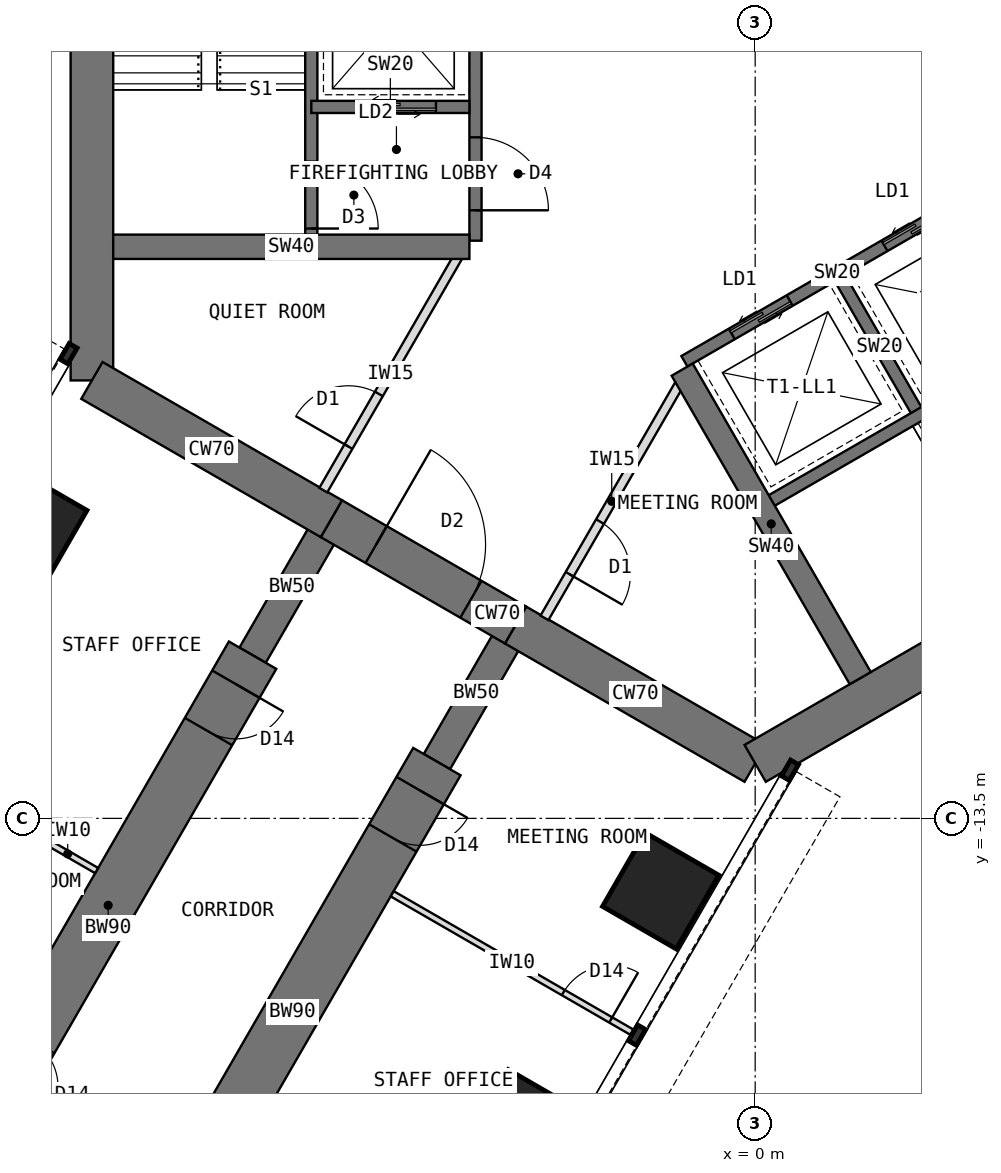
"""IFC4 building model, lengths in metres.
Left out: names, types, materials, properties, quantities, classifications, styles, units other than length and angle.
Written with IfcOpenShell. Run it as: python <this file> out.ifc"""

import sys

from ifc_helpers import new_model, si_unit, direction, frame, frame_2d, origin, origin_2d, place, context, subcontext, project, spatial, rectangle, extrude, element, fill, save


model = new_model("IFC4")
c1 = context("Model", 3, precision=1e-05, world=origin(), true_north=direction((0.0, 1.0)))
c2 = subcontext(c1, "Body", "Model", "MODEL_VIEW")
j1 = project(units=[si_unit("LENGTHUNIT", "METRE"), si_unit("PLANEANGLEUNIT", "RADIAN")], contexts=[c1])
p1 = place(None, origin())
s1 = spatial("IfcSite", under=j1, at=p1, CompositionType="ELEMENT")
p2 = place(p1, origin())
s2 = spatial("IfcBuilding", under=s1, at=p2, CompositionType="ELEMENT")
p3 = place(p2, frame((0.0, 0.0, 84.5)))
s3 = spatial("IfcBuildingStorey", under=s2, at=p3, CompositionType="ELEMENT", Elevation=84.5)
p4 = place(p3, frame((-10.908, 6.298, 0.0), z_axis=(0.0, 0.0, 1.0), x_axis=(0.0, -1.0, 0.0)))
e1 = element("IfcWall", 1, at=p4, inside=s3, PredefinedType="SHEAR", context=c2, shape_type="SweptSolid", body=[
    extrude(rectangle(XDim=12.596, YDim=0.7, at=frame_2d((6.298, 0.0))), origin(), (0.0, 0.0, 1.0), 4.0),
])
p5 = place(p3, frame((-10.908, -6.298, 0.0), z_axis=(0.0, 0.0, 1.0), x_axis=(0.866034513004, -0.499984222037, 0.0)))
e2 = element("IfcWall", 2, at=p5, inside=s3, PredefinedType="SHEAR", context=c2, shape_type="SweptSolid", body=[
    extrude(rectangle(XDim=4.548, YDim=0.7, at=frame_2d((2.274, 0.0))), origin(), (0.0, 0.0, 1.0), 4.0),
])
p6 = place(p3, frame((-6.97, -8.572, 0.0), z_axis=(0.0, 0.0, 1.0), x_axis=(0.866019471182, -0.500010275428, 0.0)))
e3 = element("IfcWall", 3, at=p6, inside=s3, PredefinedType="SHEAR", context=c2, shape_type="SweptSolid", body=[
    extrude(rectangle(XDim=3.5, YDim=0.7, at=frame_2d((1.75, 0.0))), origin(), (0.0, 0.0, 1.0), 4.0),
])
p7 = place(p6, frame((0.85, 0.0, 0.0)))
e4 = element("IfcOpeningElement", 4, at=p7, cuts=e3, PredefinedType="OPENING", context=c2, shape_type="SweptSolid", body=[
    extrude(rectangle(XDim=1.8, YDim=2.1, at=frame_2d((0.9, 1.05))), frame((0.0, 0.36, 0.0), z_axis=(0.0, -1.0, 0.0), x_axis=(1.0, 0.0, 0.0)), (0.0, 0.0, 1.0), 0.72),
])
p8 = place(p3, frame((-3.939, -10.322, 0.0), z_axis=(0.0, 0.0, 1.0), x_axis=(0.866011268655, -0.500024481964, 0.0)))
e5 = element("IfcWall", 5, at=p8, inside=s3, PredefinedType="SHEAR", context=c2, shape_type="SweptSolid", body=[
    extrude(rectangle(XDim=4.548, YDim=0.7, at=frame_2d((2.274, 0.0))), origin(), (0.0, 0.0, 1.0), 4.0),
])
p9 = place(p3, frame((0.0, -12.596, 0.0), z_axis=(0.0, 0.0, 1.0), x_axis=(0.866021940709, 0.500005998175, 0.0)))
e6 = element("IfcWall", 6, at=p9, inside=s3, PredefinedType="SHEAR", context=c2, shape_type="SweptSolid", body=[
    extrude(rectangle(XDim=12.596, YDim=0.7, at=frame_2d((6.298, 0.0))), origin(), (0.0, 0.0, 1.0), 4.0),
])
p10 = place(p3, frame((-3.939, -10.322, 0.0), z_axis=(0.0, 0.0, 1.0), x_axis=(-0.499918158782, -0.866072649678, 0.0)))
e7 = element("IfcWall", 7, at=p10, inside=s3, PredefinedType="SHEAR", context=c2, shape_type="SweptSolid", body=[
    extrude(rectangle(XDim=2.592, YDim=0.5, at=frame_2d((1.296, 0.0))), origin(), (0.0, 0.0, 1.0), 4.0),
])
p11 = place(p3, frame((-5.234, -12.566, 0.0), z_axis=(0.0, 0.0, 1.0), x_axis=(-0.499997557548, -0.86602681393, 0.0)))
e8 = element("IfcWall", 8, at=p11, inside=s3, PredefinedType="SHEAR", context=c2, shape_type="SweptSolid", body=[
    extrude(rectangle(XDim=9.5, YDim=0.9, at=frame_2d((4.75, 0.0))), origin(), (0.0, 0.0, 1.0), 4.0),
])
p12 = place(p11, frame((0.55, 0.0, 0.0)))
e9 = element("IfcOpeningElement", 9, at=p12, cuts=e8, PredefinedType="OPENING", context=c2, shape_type="SweptSolid", body=[
    extrude(rectangle(XDim=0.9, YDim=2.1, at=frame_2d((0.45, 1.05))), frame((0.0, 0.46, 0.0), z_axis=(0.0, -1.0, 0.0), x_axis=(1.0, 0.0, 0.0)), (0.0, 0.0, 1.0), 0.92),
])
p13 = place(p11, frame((7.3, 0.0, 0.0)))
e10 = element("IfcOpeningElement", 10, at=p13, cuts=e8, PredefinedType="OPENING", context=c2, shape_type="SweptSolid", body=[
    extrude(rectangle(XDim=0.9, YDim=2.1, at=frame_2d((0.45, 1.05))), frame((0.0, 0.46, 0.0), z_axis=(0.0, -1.0, 0.0), x_axis=(1.0, 0.0, 0.0)), (0.0, 0.0, 1.0), 0.92),
])
p14 = place(p3, frame((-6.97, -8.572, 0.0), z_axis=(0.0, 0.0, 1.0), x_axis=(-0.499988811324, -0.866031863473, 0.0)))
e11 = element("IfcWall", 11, at=p14, inside=s3, PredefinedType="SHEAR", context=c2, shape_type="SweptSolid", body=[
    extrude(rectangle(XDim=2.592, YDim=0.5, at=frame_2d((1.296, 0.0))), origin(), (0.0, 0.0, 1.0), 4.0),
])
p15 = place(p3, frame((-8.266, -10.816, 0.0), z_axis=(0.0, 0.0, 1.0), x_axis=(-0.499997557548, -0.86602681393, 0.0)))
e12 = element("IfcWall", 12, at=p15, inside=s3, PredefinedType="SHEAR", context=c2, shape_type="SweptSolid", body=[
    extrude(rectangle(XDim=9.5, YDim=0.9, at=frame_2d((4.75, 0.0))), origin(), (0.0, 0.0, 1.0), 4.0),
])
p16 = place(p15, frame((0.55, 0.0, 0.0)))
e13 = element("IfcOpeningElement", 13, at=p16, cuts=e12, PredefinedType="OPENING", context=c2, shape_type="SweptSolid", body=[
    extrude(rectangle(XDim=0.9, YDim=2.1, at=frame_2d((0.45, 1.05))), frame((0.0, 0.46, 0.0), z_axis=(0.0, -1.0, 0.0), x_axis=(1.0, 0.0, 0.0)), (0.0, 0.0, 1.0), 0.92),
])
p17 = place(p15, frame((7.3, 0.0, 0.0)))
e14 = element("IfcOpeningElement", 14, at=p17, cuts=e12, PredefinedType="OPENING", context=c2, shape_type="SweptSolid", body=[
    extrude(rectangle(XDim=0.9, YDim=2.1, at=frame_2d((0.45, 1.05))), frame((0.0, 0.46, 0.0), z_axis=(0.0, -1.0, 0.0), x_axis=(1.0, 0.0, 0.0)), (0.0, 0.0, 1.0), 0.92),
])
for number, where, z_axis, x_axis in (
    (15, (-1.554, -14.691, 0.0), (0.0, 0.0, 1.0), (0.5, 0.866, 0.0)),
    (16, (-11.946, -8.691, 0.0), (0.0, 0.0, 1.0), (0.5, 0.866, 0.0)),
    (17, (-3.804, -18.588, 0.0), (0.0, 0.0, 1.0), (0.5, 0.866, 0.0)),
):
    element("IfcColumn", number, at=place(p3, frame(where, z_axis=z_axis, x_axis=x_axis)), inside=s3, PredefinedType="COLUMN", context=c2, shape_type="SweptSolid", body=[
        extrude(rectangle(XDim=1.4, YDim=1.4, at=origin_2d()), origin(), (0.0, 0.0, 1.0), 4.0),
    ])
p18 = place(p3, frame((-4.6, 4.0, 0.0), z_axis=(0.0, 0.0, 1.0), x_axis=(0.0, -1.0, 0.0)))
e18 = element("IfcWall", 18, at=p18, inside=s3, PredefinedType="SHEAR", context=c2, shape_type="SweptSolid", body=[
    extrude(rectangle(XDim=8.0, YDim=0.2, at=frame_2d((4.0, 0.0))), origin(), (0.0, 0.0, 1.0), 4.0),
])
p19 = place(p18, frame((6.3, 0.0, 0.0)))
e19 = element("IfcOpeningElement", 19, at=p19, cuts=e18, PredefinedType="OPENING", context=c2, shape_type="SweptSolid", body=[
    extrude(rectangle(XDim=1.2, YDim=2.1, at=frame_2d((0.6, 1.05))), frame((0.0, 0.11, 0.0), z_axis=(0.0, -1.0, 0.0), x_axis=(1.0, 0.0, 0.0)), (0.0, 0.0, 1.0), 0.22),
])
p20 = place(p18, frame((0.9, 0.0, 0.0)))
e20 = element("IfcOpeningElement", 20, at=p20, cuts=e18, PredefinedType="OPENING", context=c2, shape_type="SweptSolid", body=[
    extrude(rectangle(XDim=1.1, YDim=2.2, at=frame_2d((0.55, 1.1))), frame((0.0, 0.11, 0.0), z_axis=(0.0, -1.0, 0.0), x_axis=(1.0, 0.0, 0.0)), (0.0, 0.0, 1.0), 0.22),
])
p21 = place(p3, frame((-4.7, -1.8, 0.0), z_axis=(0.0, 0.0, 1.0), x_axis=(-1.0, 0.0, 0.0)))
e21 = element("IfcWall", 21, at=p21, inside=s3, PredefinedType="SHEAR", context=c2, shape_type="SweptSolid", body=[
    extrude(rectangle(XDim=2.6, YDim=0.2, at=frame_2d((1.3, 0.0))), origin(), (0.0, 0.0, 1.0), 4.0),
])
p22 = place(p21, frame((0.55, 0.0, 0.0)))
e22 = element("IfcOpeningElement", 22, at=p22, cuts=e21, PredefinedType="OPENING", context=c2, shape_type="SweptSolid", body=[
    extrude(rectangle(XDim=1.3, YDim=2.2, at=frame_2d((0.65, 1.1))), frame((0.0, 0.11, 0.0), z_axis=(0.0, -1.0, 0.0), x_axis=(1.0, 0.0, 0.0)), (0.0, 0.0, 1.0), 0.22),
])
p23 = place(p3, frame((-7.3, 4.0, 0.0), z_axis=(0.0, 0.0, 1.0), x_axis=(0.0, -1.0, 0.0)))
e23 = element("IfcWall", 23, at=p23, inside=s3, PredefinedType="SHEAR", context=c2, shape_type="SweptSolid", body=[
    extrude(rectangle(XDim=8.0, YDim=0.2, at=frame_2d((4.0, 0.0))), origin(), (0.0, 0.0, 1.0), 4.0),
])
p24 = place(p23, frame((6.7, 0.0, 0.0)))
e24 = element("IfcOpeningElement", 24, at=p24, cuts=e23, PredefinedType="OPENING", context=c2, shape_type="SweptSolid", body=[
    extrude(rectangle(XDim=1.1, YDim=2.1, at=frame_2d((0.55, 1.05))), frame((0.0, 0.11, 0.0), z_axis=(0.0, -1.0, 0.0), x_axis=(1.0, 0.0, 0.0)), (0.0, 0.0, 1.0), 0.22),
])
p25 = place(p3, frame((-4.7, -4.1, 0.0), z_axis=(0.0, 0.0, 1.0), x_axis=(-1.0, 0.0, 0.0)))
e25 = element("IfcWall", 25, at=p25, inside=s3, PredefinedType="SHEAR", context=c2, shape_type="SweptSolid", body=[
    extrude(rectangle(XDim=5.858, YDim=0.4, at=frame_2d((2.929, 0.0))), origin(), (0.0, 0.0, 1.0), 4.0),
])
p26 = place(p3, frame((-1.164, -5.984, 0.0), z_axis=(0.0, 0.0, 1.0), x_axis=(0.866026010844, 0.49999894854, 0.0)))
e26 = element("IfcWall", 26, at=p26, inside=s3, PredefinedType="SHEAR", context=c2, shape_type="SweptSolid", body=[
    extrude(rectangle(XDim=8.0, YDim=0.2, at=frame_2d((4.0, 0.0))), origin(), (0.0, 0.0, 1.0), 4.0),
])
p27 = place(p26, frame((6.3, 0.0, 0.0)))
e27 = element("IfcOpeningElement", 27, at=p27, cuts=e26, PredefinedType="OPENING", context=c2, shape_type="SweptSolid", body=[
    extrude(rectangle(XDim=1.2, YDim=2.1, at=frame_2d((0.6, 1.05))), frame((0.0, 0.11, 0.0), z_axis=(0.0, -1.0, 0.0), x_axis=(1.0, 0.0, 0.0)), (0.0, 0.0, 1.0), 0.22),
])
p28 = place(p26, frame((0.9, 0.0, 0.0)))
e28 = element("IfcOpeningElement", 28, at=p28, cuts=e26, PredefinedType="OPENING", context=c2, shape_type="SweptSolid", body=[
    extrude(rectangle(XDim=1.1, YDim=2.2, at=frame_2d((0.55, 1.1))), frame((0.0, 0.11, 0.0), z_axis=(0.0, -1.0, 0.0), x_axis=(1.0, 0.0, 0.0)), (0.0, 0.0, 1.0), 0.22),
])
p29 = place(p26, frame((3.8, 0.0, 0.0)))
e29 = element("IfcOpeningElement", 29, at=p29, cuts=e26, PredefinedType="OPENING", context=c2, shape_type="SweptSolid", body=[
    extrude(rectangle(XDim=1.1, YDim=2.2, at=frame_2d((0.55, 1.1))), frame((0.0, 0.11, 0.0), z_axis=(0.0, -1.0, 0.0), x_axis=(1.0, 0.0, 0.0)), (0.0, 0.0, 1.0), 0.22),
])
p30 = place(p3, frame((1.397, -4.62, 0.0), z_axis=(0.0, 0.0, 1.0), x_axis=(0.499936506574, -0.866062058628, 0.0)))
e30 = element("IfcWall", 30, at=p30, inside=s3, PredefinedType="SHEAR", context=c2, shape_type="SweptSolid", body=[
    extrude(rectangle(XDim=2.6, YDim=0.2, at=frame_2d((1.3, 0.0))), origin(), (0.0, 0.0, 1.0), 4.0),
])
p31 = place(p3, frame((0.186, -8.322, 0.0), z_axis=(0.0, 0.0, 1.0), x_axis=(0.866026010844, 0.49999894854, 0.0)))
e31 = element("IfcWall", 31, at=p31, inside=s3, PredefinedType="SHEAR", context=c2, shape_type="SweptSolid", body=[
    extrude(rectangle(XDim=8.0, YDim=0.2, at=frame_2d((4.0, 0.0))), origin(), (0.0, 0.0, 1.0), 4.0),
])
p32 = place(p31, frame((6.7, 0.0, 0.0)))
e32 = element("IfcOpeningElement", 32, at=p32, cuts=e31, PredefinedType="OPENING", context=c2, shape_type="SweptSolid", body=[
    extrude(rectangle(XDim=1.1, YDim=2.1, at=frame_2d((0.55, 1.05))), frame((0.0, 0.11, 0.0), z_axis=(0.0, -1.0, 0.0), x_axis=(1.0, 0.0, 0.0)), (0.0, 0.0, 1.0), 0.22),
])
p33 = place(p3, frame((-1.201, -6.12, 0.0), z_axis=(0.0, 0.0, 1.0), x_axis=(0.500002627198, -0.866023886965, 0.0)))
e33 = element("IfcWall", 33, at=p33, inside=s3, PredefinedType="SHEAR", context=c2, shape_type="SweptSolid", body=[
    extrude(rectangle(XDim=5.858, YDim=0.4, at=frame_2d((2.929, 0.0))), origin(), (0.0, 0.0, 1.0), 4.0),
])
p34 = place(p3, frame((-5.97, -14.74, 0.0), z_axis=(0.0, 0.0, 1.0), x_axis=(0.866035472144, -0.499982560684, 0.0)))
e34 = element("IfcWall", 34, at=p34, inside=s3, PredefinedType="PARTITIONING", context=c2, shape_type="SweptSolid", body=[
    extrude(rectangle(XDim=4.55, YDim=0.1, at=frame_2d((2.275, 0.0))), origin(), (0.0, 0.0, 1.0), 3.8),
])
p35 = place(p34, frame((3.25, 0.0, 0.0)))
e35 = element("IfcOpeningElement", 35, at=p35, cuts=e34, PredefinedType="OPENING", context=c2, shape_type="SweptSolid", body=[
    extrude(rectangle(XDim=0.9, YDim=2.1, at=frame_2d((0.45, 1.05))), frame((0.0, 0.06, 0.0), z_axis=(0.0, -1.0, 0.0), x_axis=(1.0, 0.0, 0.0)), (0.0, 0.0, 1.0), 0.12),
])
p36 = place(p3, frame((-10.83, -14.359, 0.0), z_axis=(0.0, 0.0, 1.0), x_axis=(-0.865989465428, 0.500062241894, 0.0)))
e36 = element("IfcWall", 36, at=p36, inside=s3, PredefinedType="PARTITIONING", context=c2, shape_type="SweptSolid", body=[
    extrude(rectangle(XDim=3.4, YDim=0.1, at=frame_2d((1.7, 0.0))), origin(), (0.0, 0.0, 1.0), 3.8),
])
p37 = place(p36, frame((1.25, 0.0, 0.0)))
e37 = element("IfcOpeningElement", 37, at=p37, cuts=e36, PredefinedType="OPENING", context=c2, shape_type="SweptSolid", body=[
    extrude(rectangle(XDim=0.9, YDim=2.1, at=frame_2d((0.45, 1.05))), frame((0.0, 0.06, 0.0), z_axis=(0.0, -1.0, 0.0), x_axis=(1.0, 0.0, 0.0)), (0.0, 0.0, 1.0), 0.12),
])
p38 = place(p3, frame((-1.253, -6.37, 0.0), z_axis=(0.0, 0.0, 1.0), x_axis=(-0.500007369519, -0.866021148949, 0.0)))
e38 = element("IfcWall", 38, at=p38, inside=s3, PredefinedType="PARTITIONING", context=c2, shape_type="SweptSolid", body=[
    extrude(rectangle(XDim=4.426, YDim=0.15, at=frame_2d((2.213, 0.0))), origin(), (0.0, 0.0, 1.0), 3.8),
])
p39 = place(p38, frame((2.598, 0.0, 0.0)))
e39 = element("IfcOpeningElement", 39, at=p39, cuts=e38, PredefinedType="OPENING", context=c2, shape_type="SweptSolid", body=[
    extrude(rectangle(XDim=1.0, YDim=2.1, at=frame_2d((0.5, 1.05))), frame((0.0, 0.085, 0.0), z_axis=(0.0, -1.0, 0.0), x_axis=(1.0, 0.0, 0.0)), (0.0, 0.0, 1.0), 0.17),
])
p40 = place(p3, frame((-7.103, -8.103, 0.0), z_axis=(0.0, 0.0, 1.0), x_axis=(0.500007369519, 0.866021148949, 0.0)))
e40 = element("IfcWall", 40, at=p40, inside=s3, PredefinedType="PARTITIONING", context=c2, shape_type="SweptSolid", body=[
    extrude(rectangle(XDim=4.426, YDim=0.15, at=frame_2d((2.213, 0.0))), origin(), (0.0, 0.0, 1.0), 3.8),
])
p41 = place(p40, frame((0.828, 0.0, 0.0)))
e41 = element("IfcOpeningElement", 41, at=p41, cuts=e40, PredefinedType="OPENING", context=c2, shape_type="SweptSolid", body=[
    extrude(rectangle(XDim=1.0, YDim=2.1, at=frame_2d((0.5, 1.05))), frame((0.0, 0.085, 0.0), z_axis=(0.0, -1.0, 0.0), x_axis=(1.0, 0.0, 0.0)), (0.0, 0.0, 1.0), 0.17),
])
p42 = place(p19, origin())
e42 = element("IfcDoor", 42, at=p42, inside=s3, OperationType="SINGLE_SWING_RIGHT", PredefinedType="DOOR", context=c2, shape_type="SweptSolid", body=[
    extrude(rectangle(XDim=1.2, YDim=2.1, at=frame_2d((0.6, 1.05))), frame((0.0, 0.025, 0.0), z_axis=(0.0, -1.0, 0.0), x_axis=(1.0, 0.0, 0.0)), (0.0, 0.0, 1.0), 0.05),
])
fill(e19, e42)
p43 = place(p22, origin())
e43 = element("IfcDoor", 43, at=p43, inside=s3, OperationType="DOUBLE_DOOR_SLIDING", PredefinedType="DOOR", context=c2, shape_type="SweptSolid", body=[
    extrude(rectangle(XDim=1.3, YDim=2.2, at=frame_2d((0.65, 1.1))), frame((0.0, 0.025, 0.0), z_axis=(0.0, -1.0, 0.0), x_axis=(1.0, 0.0, 0.0)), (0.0, 0.0, 1.0), 0.05),
])
fill(e22, e43)
p44 = place(p24, origin())
e44 = element("IfcDoor", 44, at=p44, inside=s3, OperationType="SINGLE_SWING_RIGHT", PredefinedType="DOOR", context=c2, shape_type="SweptSolid", body=[
    extrude(rectangle(XDim=1.1, YDim=2.1, at=frame_2d((0.55, 1.05))), frame((0.0, 0.025, 0.0), z_axis=(0.0, -1.0, 0.0), x_axis=(1.0, 0.0, 0.0)), (0.0, 0.0, 1.0), 0.05),
])
fill(e24, e44)
p45 = place(p28, origin())
e45 = element("IfcDoor", 45, at=p45, inside=s3, OperationType="DOUBLE_DOOR_SLIDING", PredefinedType="DOOR", context=c2, shape_type="SweptSolid", body=[
    extrude(rectangle(XDim=1.1, YDim=2.2, at=frame_2d((0.55, 1.1))), frame((0.0, 0.025, 0.0), z_axis=(0.0, -1.0, 0.0), x_axis=(1.0, 0.0, 0.0)), (0.0, 0.0, 1.0), 0.05),
])
fill(e28, e45)
p46 = place(p29, origin())
e46 = element("IfcDoor", 46, at=p46, inside=s3, OperationType="DOUBLE_DOOR_SLIDING", PredefinedType="DOOR", context=c2, shape_type="SweptSolid", body=[
    extrude(rectangle(XDim=1.1, YDim=2.2, at=frame_2d((0.55, 1.1))), frame((0.0, 0.025, 0.0), z_axis=(0.0, -1.0, 0.0), x_axis=(1.0, 0.0, 0.0)), (0.0, 0.0, 1.0), 0.05),
])
fill(e29, e46)
p47 = place(p7, origin())
e47 = element("IfcDoor", 47, at=p47, inside=s3, OperationType="DOUBLE_DOOR_DOUBLE_SWING", PredefinedType="DOOR", context=c2, shape_type="SweptSolid", body=[
    extrude(rectangle(XDim=1.72, YDim=2.06, at=frame_2d((0.9, 1.03))), frame((0.0, 0.025, 0.0), z_axis=(0.0, -1.0, 0.0), x_axis=(1.0, 0.0, 0.0)), (0.0, 0.0, 1.0), 0.05),
    extrude(rectangle(XDim=0.04, YDim=2.1, at=frame_2d((0.02, 1.05))), frame((0.0, 0.35, 0.0), z_axis=(0.0, -1.0, 0.0), x_axis=(1.0, 0.0, 0.0)), (0.0, 0.0, 1.0), 0.699),
    extrude(rectangle(XDim=0.04, YDim=2.1, at=frame_2d((1.78, 1.05))), frame((0.0, 0.35, 0.0), z_axis=(0.0, -1.0, 0.0), x_axis=(1.0, 0.0, 0.0)), (0.0, 0.0, 1.0), 0.699),
    extrude(rectangle(XDim=1.72, YDim=0.04, at=frame_2d((0.9, 2.08))), frame((0.0, 0.35, 0.0), z_axis=(0.0, -1.0, 0.0), x_axis=(1.0, 0.0, 0.0)), (0.0, 0.0, 1.0), 0.699),
])
fill(e4, e47)
p48 = place(p35, origin())
e48 = element("IfcDoor", 48, at=p48, inside=s3, OperationType="SINGLE_SWING_RIGHT", PredefinedType="DOOR", context=c2, shape_type="SweptSolid", body=[
    extrude(rectangle(XDim=0.9, YDim=2.1, at=frame_2d((0.45, 1.05))), frame((0.0, 0.025, 0.0), z_axis=(0.0, -1.0, 0.0), x_axis=(1.0, 0.0, 0.0)), (0.0, 0.0, 1.0), 0.05),
])
fill(e35, e48)
p49 = place(p41, origin())
e49 = element("IfcDoor", 49, at=p49, inside=s3, OperationType="SINGLE_SWING_LEFT", PredefinedType="DOOR", context=c2, shape_type="SweptSolid", body=[
    extrude(rectangle(XDim=1.0, YDim=2.1, at=frame_2d((0.5, 1.05))), frame((0.0, 0.025, 0.0), z_axis=(0.0, -1.0, 0.0), x_axis=(1.0, 0.0, 0.0)), (0.0, 0.0, 1.0), 0.05),
])
fill(e41, e49)
p50 = place(p39, origin())
e50 = element("IfcDoor", 50, at=p50, inside=s3, OperationType="SINGLE_SWING_RIGHT", PredefinedType="DOOR", context=c2, shape_type="SweptSolid", body=[
    extrude(rectangle(XDim=1.0, YDim=2.1, at=frame_2d((0.5, 1.05))), frame((0.0, 0.025, 0.0), z_axis=(0.0, -1.0, 0.0), x_axis=(1.0, 0.0, 0.0)), (0.0, 0.0, 1.0), 0.05),
])
fill(e39, e50)
p51 = place(p12, origin())
e51 = element("IfcDoor", 51, at=p51, inside=s3, OperationType="SINGLE_SWING_LEFT", PredefinedType="DOOR", context=c2, shape_type="SweptSolid", body=[
    extrude(rectangle(XDim=0.82, YDim=2.06, at=frame_2d((0.45, 1.03))), frame((0.0, 0.025, 0.0), z_axis=(0.0, -1.0, 0.0), x_axis=(1.0, 0.0, 0.0)), (0.0, 0.0, 1.0), 0.05),
    extrude(rectangle(XDim=0.04, YDim=2.1, at=frame_2d((0.02, 1.05))), frame((0.0, 0.45, 0.0), z_axis=(0.0, -1.0, 0.0), x_axis=(1.0, 0.0, 0.0)), (0.0, 0.0, 1.0), 0.899),
    extrude(rectangle(XDim=0.04, YDim=2.1, at=frame_2d((0.88, 1.05))), frame((0.0, 0.45, 0.0), z_axis=(0.0, -1.0, 0.0), x_axis=(1.0, 0.0, 0.0)), (0.0, 0.0, 1.0), 0.899),
    extrude(rectangle(XDim=0.82, YDim=0.04, at=frame_2d((0.45, 2.08))), frame((0.0, 0.45, 0.0), z_axis=(0.0, -1.0, 0.0), x_axis=(1.0, 0.0, 0.0)), (0.0, 0.0, 1.0), 0.899),
])
fill(e9, e51)
p52 = place(p16, origin())
e52 = element("IfcDoor", 52, at=p52, inside=s3, OperationType="SINGLE_SWING_LEFT", PredefinedType="DOOR", context=c2, shape_type="SweptSolid", body=[
    extrude(rectangle(XDim=0.82, YDim=2.06, at=frame_2d((0.45, 1.03))), frame((0.0, 0.025, 0.0), z_axis=(0.0, -1.0, 0.0), x_axis=(1.0, 0.0, 0.0)), (0.0, 0.0, 1.0), 0.05),
    extrude(rectangle(XDim=0.04, YDim=2.1, at=frame_2d((0.02, 1.05))), frame((0.0, 0.45, 0.0), z_axis=(0.0, -1.0, 0.0), x_axis=(1.0, 0.0, 0.0)), (0.0, 0.0, 1.0), 0.899),
    extrude(rectangle(XDim=0.04, YDim=2.1, at=frame_2d((0.88, 1.05))), frame((0.0, 0.45, 0.0), z_axis=(0.0, -1.0, 0.0), x_axis=(1.0, 0.0, 0.0)), (0.0, 0.0, 1.0), 0.899),
    extrude(rectangle(XDim=0.82, YDim=0.04, at=frame_2d((0.45, 2.08))), frame((0.0, 0.45, 0.0), z_axis=(0.0, -1.0, 0.0), x_axis=(1.0, 0.0, 0.0)), (0.0, 0.0, 1.0), 0.899),
])
fill(e13, e52)
p53 = place(p17, origin())
e53 = element("IfcDoor", 53, at=p53, inside=s3, OperationType="SINGLE_SWING_RIGHT", PredefinedType="DOOR", context=c2, shape_type="SweptSolid", body=[
    extrude(rectangle(XDim=0.82, YDim=2.06, at=frame_2d((0.45, 1.03))), frame((0.0, 0.025, 0.0), z_axis=(0.0, -1.0, 0.0), x_axis=(1.0, 0.0, 0.0)), (0.0, 0.0, 1.0), 0.05),
    extrude(rectangle(XDim=0.04, YDim=2.1, at=frame_2d((0.02, 1.05))), frame((0.0, 0.45, 0.0), z_axis=(0.0, -1.0, 0.0), x_axis=(1.0, 0.0, 0.0)), (0.0, 0.0, 1.0), 0.899),
    extrude(rectangle(XDim=0.04, YDim=2.1, at=frame_2d((0.88, 1.05))), frame((0.0, 0.45, 0.0), z_axis=(0.0, -1.0, 0.0), x_axis=(1.0, 0.0, 0.0)), (0.0, 0.0, 1.0), 0.899),
    extrude(rectangle(XDim=0.82, YDim=0.04, at=frame_2d((0.45, 2.08))), frame((0.0, 0.45, 0.0), z_axis=(0.0, -1.0, 0.0), x_axis=(1.0, 0.0, 0.0)), (0.0, 0.0, 1.0), 0.899),
])
fill(e14, e53)
save(model, sys.argv[1])
